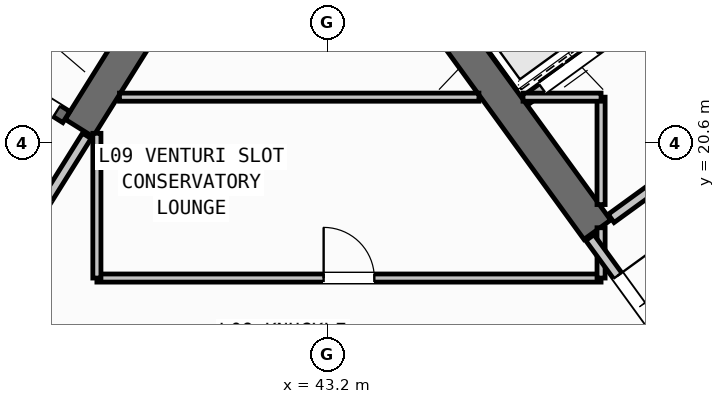
"""IFC4 building model, lengths in metres.
Left out: names, types, materials, properties, quantities, classifications, styles, units other than length and angle.
Written with IfcOpenShell. Run it as: python <this file> out.ifc"""

import sys

from ifc_helpers import new_model, si_unit, direction, frame, frame_2d, origin, place, context, subcontext, project, spatial, rectangle, extrude, source, transform, mapped, element, fill, save


model = new_model("IFC4")
c1 = context("Model", 3, precision=1e-05, world=origin(), true_north=direction((0.0, 1.0)))
c2 = subcontext(c1, "Body", "Model", "MODEL_VIEW")
j1 = project(units=[si_unit("LENGTHUNIT", "METRE"), si_unit("PLANEANGLEUNIT", "RADIAN")], contexts=[c1])
p1 = place(None, origin())
s1 = spatial("IfcSite", under=j1, at=p1, CompositionType="ELEMENT")
p2 = place(p1, origin())
s2 = spatial("IfcBuilding", under=s1, at=p2, CompositionType="ELEMENT")
p3 = place(p2, frame((0.0, 0.0, 38.4)))
s3 = spatial("IfcBuildingStorey", under=s2, at=p3, CompositionType="ELEMENT", Elevation=38.4)
p4 = place(p3, frame((40.168, 23.88, 0.0), z_axis=(0.0, 0.0, 1.0), x_axis=(-0.529893103397, -0.8480644427, 0.0)))
e1 = element("IfcWall", 1, at=p4, inside=s3, PredefinedType="SHEAR", context=c2, shape_type="SweptSolid", body=[
    extrude(rectangle(XDim=3.525, YDim=0.65, at=frame_2d((1.763, 0.0))), origin(), (0.0, 0.0, 1.0), 3.35),
])
p5 = place(p3, frame((48.526, 18.884, 0.0), z_axis=(0.0, 0.0, 1.0), x_axis=(-0.58777996584, 0.809020835181, 0.0)))
e2 = element("IfcWall", 2, at=p5, inside=s3, PredefinedType="SHEAR", context=c2, shape_type="SweptSolid", body=[
    extrude(rectangle(XDim=6.375, YDim=0.65, at=frame_2d((3.188, 0.0))), origin(), (0.0, 0.0, 1.0), 3.35),
])
p6 = place(p3, frame((38.046, 21.108, 0.0), z_axis=(0.0, 0.0, 1.0), x_axis=(-0.848054434086, 0.529909121291, 0.0)))
e3 = element("IfcWall", 3, at=p6, inside=s3, PredefinedType="SHEAR", context=c2, shape_type="SweptSolid", body=[
    extrude(rectangle(XDim=7.33, YDim=0.26, at=frame_2d((3.665, 0.0))), origin(), (0.0, 0.0, 1.0), 3.35),
])
p7 = place(p6, frame((0.22, 0.0, 0.0)))
e4 = element("IfcOpeningElement", 4, at=p7, cuts=e3, PredefinedType="OPENING", context=c2, shape_type="SweptSolid", body=[
    extrude(rectangle(XDim=1.1, YDim=2.1, at=frame_2d((0.55, 1.05))), frame((0.0, 0.14, 0.0), z_axis=(0.0, -1.0, 0.0), x_axis=(1.0, 0.0, 0.0)), (0.0, 0.0, 1.0), 0.28),
])
p8 = place(p3, frame((47.106, 21.437, 0.0), z_axis=(0.0, 0.0, 1.0), x_axis=(0.809012514015, 0.58779141893, 0.0)))
e5 = element("IfcWall", 5, at=p8, inside=s3, PredefinedType="STANDARD", context=c2, shape_type="SweptSolid", body=[
    extrude(rectangle(XDim=3.398, YDim=0.2, at=frame_2d((1.699, 0.0))), origin(), (0.0, 0.0, 1.0), 3.34),
])
p9 = place(p8, frame((0.408, 0.0, 0.0)))
e6 = element("IfcOpeningElement", 6, at=p9, cuts=e5, PredefinedType="OPENING", context=c2, shape_type="SweptSolid", body=[
    extrude(rectangle(XDim=1.3, YDim=2.2, at=frame_2d((0.65, 1.1))), frame((0.0, 0.11, 0.0), z_axis=(0.0, -1.0, 0.0), x_axis=(1.0, 0.0, 0.0)), (0.0, 0.0, 1.0), 0.22),
])
p10 = place(p3, frame((48.799, 19.107, 0.0), z_axis=(0.0, 0.0, 1.0), x_axis=(0.809012959416, 0.587790805897, 0.0)))
e7 = element("IfcWall", 7, at=p10, inside=s3, PredefinedType="STANDARD", context=c2, shape_type="SweptSolid", body=[
    extrude(rectangle(XDim=5.718, YDim=0.2, at=frame_2d((2.859, 0.0))), origin(), (0.0, 0.0, 1.0), 3.34),
])
p11 = place(p10, frame((2.498, 0.0, 0.0)))
e8 = element("IfcOpeningElement", 8, at=p11, cuts=e7, PredefinedType="OPENING", context=c2, shape_type="SweptSolid", body=[
    extrude(rectangle(XDim=1.15, YDim=2.1, at=frame_2d((0.575, 1.05))), frame((0.0, 0.11, 0.0), z_axis=(0.0, -1.0, 0.0), x_axis=(1.0, 0.0, 0.0)), (0.0, 0.0, 1.0), 0.22),
])
p12 = place(p3, frame((38.451, 20.737, 0.0), z_axis=(0.0, 0.0, 1.0), x_axis=(-0.529924799939, -0.848044637038, 0.0)))
e9 = element("IfcWall", 9, at=p12, inside=s3, PredefinedType="STANDARD", context=c2, shape_type="SweptSolid", body=[
    extrude(rectangle(XDim=2.96, YDim=0.2, at=frame_2d((1.48, 0.0))), origin(), (0.0, 0.0, 1.0), 3.34),
])
p13 = place(p12, frame((1.46, 0.0, 0.0)))
e10 = element("IfcOpeningElement", 10, at=p13, cuts=e9, PredefinedType="OPENING", context=c2, shape_type="SweptSolid", body=[
    extrude(rectangle(XDim=0.86, YDim=2.05, at=frame_2d((0.43, 1.025))), frame((0.0, 0.11, 0.0), z_axis=(0.0, -1.0, 0.0), x_axis=(1.0, 0.0, 0.0)), (0.0, 0.0, 1.0), 0.22),
])
p14 = place(p3, frame((38.65, 17.93, 0.0), z_axis=(0.0, 0.0, 1.0), x_axis=(1.0, 0.0, 0.0)))
e11 = element("IfcWall", 11, at=p14, inside=s3, PredefinedType="PARTITIONING", context=c2, shape_type="SweptSolid", body=[
    extrude(rectangle(XDim=9.95, YDim=0.16, at=frame_2d((4.975, 0.0))), origin(), (0.0, 0.0, 1.0), 3.34),
])
p15 = place(p14, frame((4.475, 0.0, 0.0)))
e12 = element("IfcOpeningElement", 12, at=p15, cuts=e11, PredefinedType="OPENING", context=c2, shape_type="SweptSolid", body=[
    extrude(rectangle(XDim=1.0, YDim=2.1, at=frame_2d((0.5, 1.05))), frame((0.0, 0.09, 0.0), z_axis=(0.0, -1.0, 0.0), x_axis=(1.0, 0.0, 0.0)), (0.0, 0.0, 1.0), 0.18),
])
p16 = place(p3, frame((38.65, 17.93, 0.0), z_axis=(0.0, 0.0, 1.0), x_axis=(0.0, 1.0, 0.0)))
e13 = element("IfcWall", 13, at=p16, inside=s3, PredefinedType="PARTITIONING", context=c2, shape_type="SweptSolid", body=[
    extrude(rectangle(XDim=2.857, YDim=0.16, at=frame_2d((1.428, 0.0))), origin(), (0.0, 0.0, 1.0), 3.34),
])
p17 = place(p3, frame((48.6, 17.93, 0.0), z_axis=(0.0, 0.0, 1.0), x_axis=(0.0, 1.0, 0.0)))
e14 = element("IfcWall", 14, at=p17, inside=s3, PredefinedType="PARTITIONING", context=c2, shape_type="SweptSolid", body=[
    extrude(rectangle(XDim=0.993, YDim=0.16, at=frame_2d((0.496, 0.0))), origin(), (0.0, 0.0, 1.0), 3.34),
])
p18 = place(p3, frame((48.6, 19.38, 0.0), z_axis=(0.0, 0.0, 1.0), x_axis=(0.0, 1.0, 0.0)))
e15 = element("IfcWall", 15, at=p18, inside=s3, PredefinedType="PARTITIONING", context=c2, shape_type="SweptSolid", body=[
    extrude(rectangle(XDim=2.12, YDim=0.16, at=frame_2d((1.06, 0.0))), origin(), (0.0, 0.0, 1.0), 3.34),
])
p19 = place(p3, frame((39.095, 21.5, 0.0), z_axis=(0.0, 0.0, 1.0), x_axis=(1.0, 0.0, 0.0)))
e16 = element("IfcWall", 16, at=p19, inside=s3, PredefinedType="PARTITIONING", context=c2, shape_type="SweptSolid", body=[
    extrude(rectangle(XDim=7.094, YDim=0.16, at=frame_2d((3.547, 0.0))), origin(), (0.0, 0.0, 1.0), 3.34),
])
p20 = place(p3, frame((47.06, 21.5, 0.0), z_axis=(0.0, 0.0, 1.0), x_axis=(1.0, 0.0, 0.0)))
e17 = element("IfcWall", 17, at=p20, inside=s3, PredefinedType="PARTITIONING", context=c2, shape_type="SweptSolid", body=[
    extrude(rectangle(XDim=1.54, YDim=0.16, at=frame_2d((0.77, 0.0))), origin(), (0.0, 0.0, 1.0), 3.34),
])
p21 = place(p3, frame((50.119, 16.333, 0.0), z_axis=(0.0, 0.0, 1.0), x_axis=(-0.587749856981, 0.809042709391, 0.0)))
e18 = element("IfcWall", 18, at=p21, inside=s3, PredefinedType="STANDARD", context=c2, shape_type="SweptSolid", body=[
    extrude(rectangle(XDim=2.96, YDim=0.2, at=frame_2d((1.48, 0.0))), origin(), (0.0, 0.0, 1.0), 3.34),
])
p22 = place(p21, frame((0.53, 0.0, 0.0)))
e19 = element("IfcOpeningElement", 19, at=p22, cuts=e18, PredefinedType="OPENING", context=c2, shape_type="SweptSolid", body=[
    extrude(rectangle(XDim=1.5, YDim=2.15, at=frame_2d((0.75, 1.075))), frame((0.0, 0.11, 0.0), z_axis=(0.0, -1.0, 0.0), x_axis=(1.0, 0.0, 0.0)), (0.0, 0.0, 1.0), 0.22),
])
m1 = source(origin(), c2, "Body", "SweptSolid", [
    extrude(rectangle(XDim=1.1, YDim=2.1, at=frame_2d((0.55, 1.05))), frame((0.0, 0.025, 0.0), z_axis=(0.0, -1.0, 0.0), x_axis=(1.0, 0.0, 0.0)), (0.0, 0.0, 1.0), 0.05),
])
p23 = place(p7, origin())
e20 = element("IfcDoor", 20, at=p23, inside=s3, OperationType="SINGLE_SWING_RIGHT", PredefinedType="DOOR", context=c2, shape_type="MappedRepresentation", body=[
    mapped(m1, transform((0.0, 0.0, 0.0), scale=1.0)),
])
fill(e4, e20)
m2 = source(origin(), c2, "Body", "SweptSolid", [
    extrude(rectangle(XDim=1.3, YDim=2.2, at=frame_2d((0.65, 1.1))), frame((0.0, 0.025, 0.0), z_axis=(0.0, -1.0, 0.0), x_axis=(1.0, 0.0, 0.0)), (0.0, 0.0, 1.0), 0.05),
])
p24 = place(p9, origin())
e21 = element("IfcDoor", 21, at=p24, inside=s3, OperationType="DOUBLE_DOOR_SLIDING", PredefinedType="DOOR", context=c2, shape_type="MappedRepresentation", body=[
    mapped(m2, transform((0.0, 0.0, 0.0), scale=1.0)),
])
fill(e6, e21)
m3 = source(origin(), c2, "Body", "SweptSolid", [
    extrude(rectangle(XDim=1.0, YDim=2.1, at=frame_2d((0.5, 1.05))), frame((0.0, 0.025, 0.0), z_axis=(0.0, -1.0, 0.0), x_axis=(1.0, 0.0, 0.0)), (0.0, 0.0, 1.0), 0.05),
])
p25 = place(p15, origin())
e22 = element("IfcDoor", 22, at=p25, inside=s3, OperationType="SINGLE_SWING_LEFT", PredefinedType="DOOR", context=c2, shape_type="MappedRepresentation", body=[
    mapped(m3, transform((0.0, 0.0, 0.0), scale=1.0)),
])
fill(e12, e22)
m4 = source(origin(), c2, "Body", "SweptSolid", [
    extrude(rectangle(XDim=1.5, YDim=2.15, at=frame_2d((0.75, 1.075))), frame((0.0, 0.025, 0.0), z_axis=(0.0, -1.0, 0.0), x_axis=(1.0, 0.0, 0.0)), (0.0, 0.0, 1.0), 0.05),
])
p26 = place(p22, frame((1.5, 0.0, 0.0), z_axis=(0.0, 0.0, 1.0), x_axis=(-1.0, 0.0, 0.0)))
e23 = element("IfcDoor", 23, at=p26, inside=s3, OperationType="DOUBLE_DOOR_SINGLE_SWING", PredefinedType="DOOR", context=c2, shape_type="MappedRepresentation", body=[
    mapped(m4, transform((0.0, 0.0, 0.0), scale=1.0)),
])
fill(e19, e23)
save(model, sys.argv[1])
